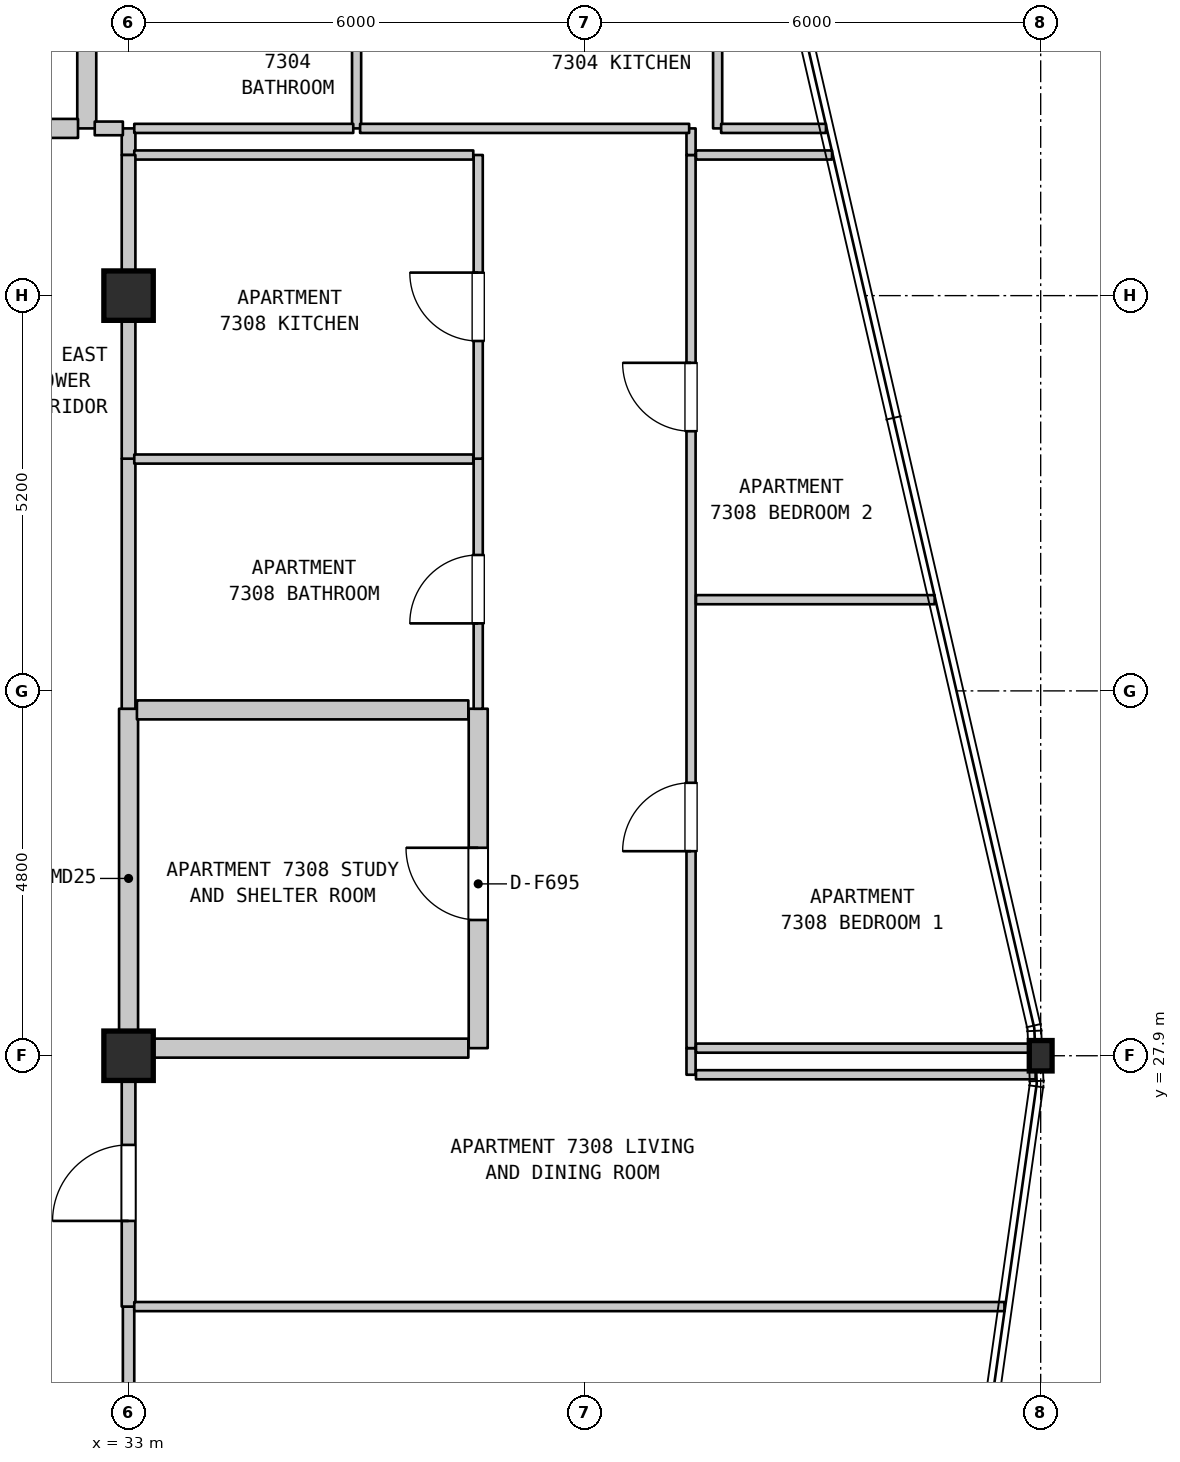
"""IFC4 building model, lengths in metres.
Left out: names, types, materials, properties, quantities, classifications, styles, units other than length and angle.
Written with IfcOpenShell. Run it as: python <this file> out.ifc"""

import sys

from ifc_helpers import new_model, si_unit, direction, frame, frame_2d, origin, origin_2d, place, context, subcontext, project, spatial, rectangle, i_section, extrude, element, fill, save


model = new_model("IFC4")
c1 = context("Model", 3, precision=1e-05, world=origin(), true_north=direction((0.0, 1.0)))
c2 = subcontext(c1, "Body", "Model", "MODEL_VIEW")
j1 = project(units=[si_unit("LENGTHUNIT", "METRE"), si_unit("PLANEANGLEUNIT", "RADIAN")], contexts=[c1])
p1 = place(None, origin())
s1 = spatial("IfcSite", under=j1, at=p1, CompositionType="ELEMENT")
p2 = place(p1, origin())
s2 = spatial("IfcBuilding", under=s1, at=p2, CompositionType="ELEMENT")
p3 = place(p2, frame((0.0, 0.0, 291.7)))
s3 = spatial("IfcBuildingStorey", under=s2, at=p3, CompositionType="ELEMENT", Elevation=291.7)
for number, where, z_axis, x_axis in (
    (1, (33.0, 27.9, 0.0), (0.0, 0.0, 1.0), (1.0, 0.0, 0.0)),
    (2, (33.0, 37.9, 0.0), (0.0, 0.0, 1.0), (1.0, 0.0, 0.0)),
):
    element("IfcColumn", number, at=place(p3, frame(where, z_axis=z_axis, x_axis=x_axis)), inside=s3, PredefinedType="COLUMN", context=c2, shape_type="SweptSolid", body=[
        extrude(rectangle(XDim=0.65, YDim=0.65, at=origin_2d()), origin(), (0.0, 0.0, 1.0), 3.7),
    ])
p4 = place(p3, frame((45.0, 27.9, 0.0), z_axis=(0.0, 0.0, 1.0), x_axis=(1.0, 0.0, 0.0)))
e3 = element("IfcColumn", 3, at=p4, inside=s3, PredefinedType="COLUMN", context=c2, shape_type="SweptSolid", body=[
    extrude(i_section(OverallWidth=0.3, OverallDepth=0.4, WebThickness=0.013, FlangeThickness=0.024, FilletRadius=0.027, at=origin_2d()), origin(), (0.0, 0.0, 1.0), 3.7),
])
p5 = place(p3, frame((32.45, 40.1, 0.0), z_axis=(0.0, 0.0, 1.0), x_axis=(0.0, 1.0, 0.0)))
e4 = element("IfcWall", 4, at=p5, inside=s3, PredefinedType="STANDARD", context=c2, shape_type="SweptSolid", body=[
    extrude(rectangle(XDim=2.3, YDim=0.25, at=frame_2d((1.15, 0.0))), origin(), (0.0, 0.0, 1.0), 3.39),
])
p6 = place(p3, frame((33.0, 19.5, 0.0), z_axis=(0.0, 0.0, 1.0), x_axis=(0.0, 1.0, 0.0)))
e5 = element("IfcWall", 5, at=p6, inside=s3, PredefinedType="STANDARD", context=c2, shape_type="SweptSolid", body=[
    extrude(rectangle(XDim=5.1, YDim=0.15, at=frame_2d((2.55, 0.0))), origin(), (0.0, 0.0, 1.0), 3.1),
])
p7 = place(p6, frame((1.547, 0.0, 0.0)))
e6 = element("IfcOpeningElement", 6, at=p7, cuts=e5, PredefinedType="OPENING", context=c2, shape_type="SweptSolid", body=[
    extrude(rectangle(XDim=1.0, YDim=2.15, at=frame_2d((0.5, 1.075))), frame((0.0, 0.085, 0.0), z_axis=(0.0, -1.0, 0.0), x_axis=(1.0, 0.0, 0.0)), (0.0, 0.0, 1.0), 0.17),
])
p8 = place(p3, frame((33.0, 24.6, 0.0), z_axis=(0.0, 0.0, 1.0), x_axis=(0.0, 1.0, 0.0)))
e7 = element("IfcWall", 7, at=p8, inside=s3, PredefinedType="STANDARD", context=c2, shape_type="SweptSolid", body=[
    extrude(rectangle(XDim=3.4, YDim=0.18, at=frame_2d((1.7, 0.0))), origin(), (0.0, 0.0, 1.0), 3.1),
])
p9 = place(p8, frame((1.127, 0.0, 0.0)))
e8 = element("IfcOpeningElement", 8, at=p9, cuts=e7, PredefinedType="OPENING", context=c2, shape_type="SweptSolid", body=[
    extrude(rectangle(XDim=1.0, YDim=2.15, at=frame_2d((0.5, 1.075))), frame((0.0, 0.1, 0.0), z_axis=(0.0, -1.0, 0.0), x_axis=(1.0, 0.0, 0.0)), (0.0, 0.0, 1.0), 0.2),
])
p10 = place(p3, frame((33.0, 28.0, 0.0), z_axis=(0.0, 0.0, 1.0), x_axis=(0.0, 1.0, 0.0)))
e9 = element("IfcWall", 9, at=p10, inside=s3, PredefinedType="STANDARD", context=c2, shape_type="SweptSolid", body=[
    extrude(rectangle(XDim=4.465, YDim=0.25, at=frame_2d((2.232, 0.0))), origin(), (0.0, 0.0, 1.0), 2.89),
])
p11 = place(p3, frame((33.0, 32.465, 0.0), z_axis=(0.0, 0.0, 1.0), x_axis=(0.0, 1.0, 0.0)))
e10 = element("IfcWall", 10, at=p11, inside=s3, PredefinedType="STANDARD", context=c2, shape_type="SweptSolid", body=[
    extrude(rectangle(XDim=3.29, YDim=0.18, at=frame_2d((1.645, 0.0))), origin(), (0.0, 0.0, 1.0), 2.89),
])
p12 = place(p3, frame((33.0, 35.755, 0.0), z_axis=(0.0, 0.0, 1.0), x_axis=(0.0, 1.0, 0.0)))
e11 = element("IfcWall", 11, at=p12, inside=s3, PredefinedType="STANDARD", context=c2, shape_type="SweptSolid", body=[
    extrude(rectangle(XDim=2.145, YDim=0.18, at=frame_2d((1.073, 0.0))), origin(), (0.0, 0.0, 1.0), 2.89),
])
p13 = place(p3, frame((33.0, 39.75, 0.0), z_axis=(0.0, 0.0, 1.0), x_axis=(0.0, 1.0, 0.0)))
e12 = element("IfcWall", 12, at=p13, inside=s3, PredefinedType="STANDARD", context=c2, shape_type="SweptSolid", body=[
    extrude(rectangle(XDim=0.35, YDim=0.18, at=frame_2d((0.175, 0.0))), origin(), (0.0, 0.0, 1.0), 3.39),
])
p14 = place(p3, frame((36.0, 40.1, 0.0), z_axis=(0.0, 0.0, 1.0), x_axis=(0.0, 1.0, 0.0)))
e13 = element("IfcWall", 13, at=p14, inside=s3, PredefinedType="PARTITIONING", context=c2, shape_type="SweptSolid", body=[
    extrude(rectangle(XDim=2.3, YDim=0.12, at=frame_2d((1.15, 0.0))), origin(), (0.0, 0.0, 1.0), 3.39),
])
p15 = place(p3, frame((37.6, 28.0, 0.0), z_axis=(0.0, 0.0, 1.0), x_axis=(0.0, 1.0, 0.0)))
e14 = element("IfcWall", 14, at=p15, inside=s3, PredefinedType="STANDARD", context=c2, shape_type="SweptSolid", body=[
    extrude(rectangle(XDim=4.465, YDim=0.25, at=frame_2d((2.232, 0.0))), origin(), (0.0, 0.0, 1.0), 3.39),
])
p16 = place(p15, frame((1.686, 0.0, 0.0)))
e15 = element("IfcOpeningElement", 15, at=p16, cuts=e14, PredefinedType="OPENING", context=c2, shape_type="SweptSolid", body=[
    extrude(rectangle(XDim=0.95, YDim=2.15, at=frame_2d((0.475, 1.075))), frame((0.0, 0.135, 0.0), z_axis=(0.0, -1.0, 0.0), x_axis=(1.0, 0.0, 0.0)), (0.0, 0.0, 1.0), 0.27),
])
p17 = place(p3, frame((37.6, 32.465, 0.0), z_axis=(0.0, 0.0, 1.0), x_axis=(0.0, 1.0, 0.0)))
e16 = element("IfcWall", 16, at=p17, inside=s3, PredefinedType="PARTITIONING", context=c2, shape_type="SweptSolid", body=[
    extrude(rectangle(XDim=3.29, YDim=0.12, at=frame_2d((1.645, 0.0))), origin(), (0.0, 0.0, 1.0), 3.39),
])
p18 = place(p17, frame((1.123, 0.0, 0.0)))
e17 = element("IfcOpeningElement", 17, at=p18, cuts=e16, PredefinedType="OPENING", context=c2, shape_type="SweptSolid", body=[
    extrude(rectangle(XDim=0.9, YDim=2.1, at=frame_2d((0.45, 1.05))), frame((0.0, 0.07, 0.0), z_axis=(0.0, -1.0, 0.0), x_axis=(1.0, 0.0, 0.0)), (0.0, 0.0, 1.0), 0.14),
])
p19 = place(p3, frame((37.6, 35.755, 0.0), z_axis=(0.0, 0.0, 1.0), x_axis=(0.0, 1.0, 0.0)))
e18 = element("IfcWall", 18, at=p19, inside=s3, PredefinedType="PARTITIONING", context=c2, shape_type="SweptSolid", body=[
    extrude(rectangle(XDim=3.995, YDim=0.12, at=frame_2d((1.998, 0.0))), origin(), (0.0, 0.0, 1.0), 3.39),
])
p20 = place(p19, frame((1.548, 0.0, 0.0)))
e19 = element("IfcOpeningElement", 19, at=p20, cuts=e18, PredefinedType="OPENING", context=c2, shape_type="SweptSolid", body=[
    extrude(rectangle(XDim=0.9, YDim=2.15, at=frame_2d((0.45, 1.075))), frame((0.0, 0.07, 0.0), z_axis=(0.0, -1.0, 0.0), x_axis=(1.0, 0.0, 0.0)), (0.0, 0.0, 1.0), 0.14),
])
p21 = place(p3, frame((40.4, 27.65, 0.0), z_axis=(0.0, 0.0, 1.0), x_axis=(0.0, 1.0, 0.0)))
e20 = element("IfcWall", 20, at=p21, inside=s3, PredefinedType="PARTITIONING", context=c2, shape_type="SweptSolid", body=[
    extrude(rectangle(XDim=0.35, YDim=0.12, at=frame_2d((0.175, 0.0))), origin(), (0.0, 0.0, 1.0), 3.39),
])
p22 = place(p3, frame((40.4, 28.0, 0.0), z_axis=(0.0, 0.0, 1.0), x_axis=(0.0, 1.0, 0.0)))
e21 = element("IfcWall", 21, at=p22, inside=s3, PredefinedType="PARTITIONING", context=c2, shape_type="SweptSolid", body=[
    extrude(rectangle(XDim=11.75, YDim=0.12, at=frame_2d((5.875, 0.0))), origin(), (0.0, 0.0, 1.0), 3.39),
])
p23 = place(p22, frame((2.591, 0.0, 0.0)))
e22 = element("IfcOpeningElement", 22, at=p23, cuts=e21, PredefinedType="OPENING", context=c2, shape_type="SweptSolid", body=[
    extrude(rectangle(XDim=0.9, YDim=2.15, at=frame_2d((0.45, 1.075))), frame((0.0, 0.07, 0.0), z_axis=(0.0, -1.0, 0.0), x_axis=(1.0, 0.0, 0.0)), (0.0, 0.0, 1.0), 0.14),
])
p24 = place(p22, frame((8.116, 0.0, 0.0)))
e23 = element("IfcOpeningElement", 23, at=p24, cuts=e21, PredefinedType="OPENING", context=c2, shape_type="SweptSolid", body=[
    extrude(rectangle(XDim=0.9, YDim=2.15, at=frame_2d((0.45, 1.075))), frame((0.0, 0.07, 0.0), z_axis=(0.0, -1.0, 0.0), x_axis=(1.0, 0.0, 0.0)), (0.0, 0.0, 1.0), 0.14),
])
p25 = place(p3, frame((40.4, 39.75, 0.0), z_axis=(0.0, 0.0, 1.0), x_axis=(0.0, 1.0, 0.0)))
e24 = element("IfcWall", 24, at=p25, inside=s3, PredefinedType="PARTITIONING", context=c2, shape_type="SweptSolid", body=[
    extrude(rectangle(XDim=0.35, YDim=0.12, at=frame_2d((0.175, 0.0))), origin(), (0.0, 0.0, 1.0), 3.39),
])
p26 = place(p3, frame((40.75, 40.1, 0.0), z_axis=(0.0, 0.0, 1.0), x_axis=(0.0, 1.0, 0.0)))
e25 = element("IfcWall", 25, at=p26, inside=s3, PredefinedType="PARTITIONING", context=c2, shape_type="SweptSolid", body=[
    extrude(rectangle(XDim=2.3, YDim=0.12, at=frame_2d((1.15, 0.0))), origin(), (0.0, 0.0, 1.0), 3.39),
])
p27 = place(p3, frame((33.075, 24.6, 0.0), z_axis=(0.0, 0.0, 1.0), x_axis=(1.0, 0.0, 0.0)))
e26 = element("IfcWall", 26, at=p27, inside=s3, PredefinedType="PARTITIONING", context=c2, shape_type="SweptSolid", body=[
    extrude(rectangle(XDim=11.448, YDim=0.12, at=frame_2d((5.724, 0.0))), origin(), (0.0, 0.0, 1.0), 3.39),
])
p28 = place(p3, frame((40.465, 27.65, 0.0), z_axis=(0.0, 0.0, 1.0), x_axis=(1.0, 0.0, 0.0)))
e27 = element("IfcWall", 27, at=p28, inside=s3, PredefinedType="PARTITIONING", context=c2, shape_type="SweptSolid", body=[
    extrude(rectangle(XDim=4.468, YDim=0.12, at=frame_2d((2.234, 0.0))), origin(), (0.0, 0.0, 1.0), 3.39),
])
p29 = place(p3, frame((33.11, 28.0, 0.0), z_axis=(0.0, 0.0, 1.0), x_axis=(1.0, 0.0, 0.0)))
e28 = element("IfcWall", 28, at=p29, inside=s3, PredefinedType="STANDARD", context=c2, shape_type="SweptSolid", body=[
    extrude(rectangle(XDim=4.36, YDim=0.25, at=frame_2d((2.18, 0.0))), origin(), (0.0, 0.0, 1.0), 2.89),
])
p30 = place(p3, frame((40.465, 28.0, 0.0), z_axis=(0.0, 0.0, 1.0), x_axis=(1.0, 0.0, 0.0)))
e29 = element("IfcWall", 29, at=p30, inside=s3, PredefinedType="PARTITIONING", context=c2, shape_type="SweptSolid", body=[
    extrude(rectangle(XDim=4.452, YDim=0.12, at=frame_2d((2.226, 0.0))), origin(), (0.0, 0.0, 1.0), 2.89),
])
p31 = place(p3, frame((33.11, 32.45, 0.0), z_axis=(0.0, 0.0, 1.0), x_axis=(1.0, 0.0, 0.0)))
e30 = element("IfcWall", 30, at=p31, inside=s3, PredefinedType="STANDARD", context=c2, shape_type="SweptSolid", body=[
    extrude(rectangle(XDim=4.36, YDim=0.25, at=frame_2d((2.18, 0.0))), origin(), (0.0, 0.0, 1.0), 3.39),
])
p32 = place(p3, frame((40.465, 33.9, 0.0), z_axis=(0.0, 0.0, 1.0), x_axis=(1.0, 0.0, 0.0)))
e31 = element("IfcWall", 31, at=p32, inside=s3, PredefinedType="PARTITIONING", context=c2, shape_type="SweptSolid", body=[
    extrude(rectangle(XDim=3.14, YDim=0.12, at=frame_2d((1.57, 0.0))), origin(), (0.0, 0.0, 1.0), 3.39),
])
for number, where, z_axis, x_axis in (
    (32, (33.075, 35.75, 0.0), (0.0, 0.0, 1.0), (1.0, 0.0, 0.0)),
    (33, (33.075, 39.75, 0.0), (0.0, 0.0, 1.0), (1.0, 0.0, 0.0)),
):
    element("IfcWall", number, at=place(p3, frame(where, z_axis=z_axis, x_axis=x_axis)), inside=s3, PredefinedType="PARTITIONING", context=c2, shape_type="SweptSolid", body=[
        extrude(rectangle(XDim=4.46, YDim=0.12, at=frame_2d((2.23, 0.0))), origin(), (0.0, 0.0, 1.0), 3.39),
    ])
p33 = place(p3, frame((40.465, 39.75, 0.0), z_axis=(0.0, 0.0, 1.0), x_axis=(1.0, 0.0, 0.0)))
e34 = element("IfcWall", 34, at=p33, inside=s3, PredefinedType="PARTITIONING", context=c2, shape_type="SweptSolid", body=[
    extrude(rectangle(XDim=1.79, YDim=0.12, at=frame_2d((0.895, 0.0))), origin(), (0.0, 0.0, 1.0), 3.39),
])
p34 = place(p3, frame((28.16, 40.1, 0.0), z_axis=(0.0, 0.0, 1.0), x_axis=(1.0, 0.0, 0.0)))
e35 = element("IfcWall", 35, at=p34, inside=s3, PredefinedType="STANDARD", context=c2, shape_type="SweptSolid", body=[
    extrude(rectangle(XDim=4.175, YDim=0.25, at=frame_2d((2.087, 0.0))), origin(), (0.0, 0.0, 1.0), 3.39),
])
p35 = place(p3, frame((32.555, 40.1, 0.0), z_axis=(0.0, 0.0, 1.0), x_axis=(1.0, 0.0, 0.0)))
e36 = element("IfcWall", 36, at=p35, inside=s3, PredefinedType="STANDARD", context=c2, shape_type="SweptSolid", body=[
    extrude(rectangle(XDim=0.37, YDim=0.18, at=frame_2d((0.185, 0.0))), origin(), (0.0, 0.0, 1.0), 3.39),
])
p36 = place(p3, frame((33.075, 40.1, 0.0), z_axis=(0.0, 0.0, 1.0), x_axis=(1.0, 0.0, 0.0)))
e37 = element("IfcWall", 37, at=p36, inside=s3, PredefinedType="PARTITIONING", context=c2, shape_type="SweptSolid", body=[
    extrude(rectangle(XDim=2.881, YDim=0.12, at=frame_2d((1.44, 0.0))), origin(), (0.0, 0.0, 1.0), 3.39),
])
p37 = place(p3, frame((36.046, 40.1, 0.0), z_axis=(0.0, 0.0, 1.0), x_axis=(1.0, 0.0, 0.0)))
e38 = element("IfcWall", 38, at=p37, inside=s3, PredefinedType="PARTITIONING", context=c2, shape_type="SweptSolid", body=[
    extrude(rectangle(XDim=4.329, YDim=0.12, at=frame_2d((2.165, 0.0))), origin(), (0.0, 0.0, 1.0), 3.39),
])
p38 = place(p3, frame((40.796, 40.1, 0.0), z_axis=(0.0, 0.0, 1.0), x_axis=(1.0, 0.0, 0.0)))
e39 = element("IfcWall", 39, at=p38, inside=s3, PredefinedType="PARTITIONING", context=c2, shape_type="SweptSolid", body=[
    extrude(rectangle(XDim=1.379, YDim=0.12, at=frame_2d((0.689, 0.0))), origin(), (0.0, 0.0, 1.0), 3.39),
])
p39 = place(p3, frame((33.0, 37.9, 0.0), z_axis=(0.0, 0.0, 1.0), x_axis=(0.0, 1.0, 0.0)))
e40 = element("IfcWall", 40, at=p39, inside=s3, PredefinedType="STANDARD", context=c2, shape_type="SweptSolid", body=[
    extrude(rectangle(XDim=1.85, YDim=0.18, at=frame_2d((0.925, 0.0))), origin(), (0.0, 0.0, 1.0), 2.79),
])
p40 = place(p9, origin())
e41 = element("IfcDoor", 41, at=p40, inside=s3, OperationType="SINGLE_SWING_LEFT", PredefinedType="DOOR", context=c2, shape_type="SweptSolid", body=[
    extrude(rectangle(XDim=1.0, YDim=2.15, at=frame_2d((0.5, 1.075))), frame((0.0, 0.025, 0.0), z_axis=(0.0, -1.0, 0.0), x_axis=(1.0, 0.0, 0.0)), (0.0, 0.0, 1.0), 0.05),
])
fill(e8, e41)
p41 = place(p16, origin())
e42 = element("IfcDoor", 42, at=p41, inside=s3, OperationType="SINGLE_SWING_RIGHT", PredefinedType="DOOR", context=c2, shape_type="SweptSolid", body=[
    extrude(rectangle(XDim=0.95, YDim=2.15, at=frame_2d((0.475, 1.075))), frame((0.0, 0.025, 0.0), z_axis=(0.0, -1.0, 0.0), x_axis=(1.0, 0.0, 0.0)), (0.0, 0.0, 1.0), 0.05),
])
fill(e15, e42)
p42 = place(p18, origin())
e43 = element("IfcDoor", 43, at=p42, inside=s3, OperationType="SINGLE_SWING_LEFT", PredefinedType="DOOR", context=c2, shape_type="SweptSolid", body=[
    extrude(rectangle(XDim=0.9, YDim=2.1, at=frame_2d((0.45, 1.05))), frame((0.0, 0.025, 0.0), z_axis=(0.0, -1.0, 0.0), x_axis=(1.0, 0.0, 0.0)), (0.0, 0.0, 1.0), 0.05),
])
fill(e17, e43)
p43 = place(p20, origin())
e44 = element("IfcDoor", 44, at=p43, inside=s3, OperationType="SINGLE_SWING_RIGHT", PredefinedType="DOOR", context=c2, shape_type="SweptSolid", body=[
    extrude(rectangle(XDim=0.9, YDim=2.15, at=frame_2d((0.45, 1.075))), frame((0.0, 0.025, 0.0), z_axis=(0.0, -1.0, 0.0), x_axis=(1.0, 0.0, 0.0)), (0.0, 0.0, 1.0), 0.05),
])
fill(e19, e44)
p44 = place(p23, origin())
e45 = element("IfcDoor", 45, at=p44, inside=s3, OperationType="SINGLE_SWING_LEFT", PredefinedType="DOOR", context=c2, shape_type="SweptSolid", body=[
    extrude(rectangle(XDim=0.9, YDim=2.15, at=frame_2d((0.45, 1.075))), frame((0.0, 0.025, 0.0), z_axis=(0.0, -1.0, 0.0), x_axis=(1.0, 0.0, 0.0)), (0.0, 0.0, 1.0), 0.05),
])
fill(e22, e45)
p45 = place(p24, origin())
e46 = element("IfcDoor", 46, at=p45, inside=s3, OperationType="SINGLE_SWING_RIGHT", PredefinedType="DOOR", context=c2, shape_type="SweptSolid", body=[
    extrude(rectangle(XDim=0.9, YDim=2.15, at=frame_2d((0.45, 1.075))), frame((0.0, 0.025, 0.0), z_axis=(0.0, -1.0, 0.0), x_axis=(1.0, 0.0, 0.0)), (0.0, 0.0, 1.0), 0.05),
])
fill(e23, e46)
save(model, sys.argv[1])
